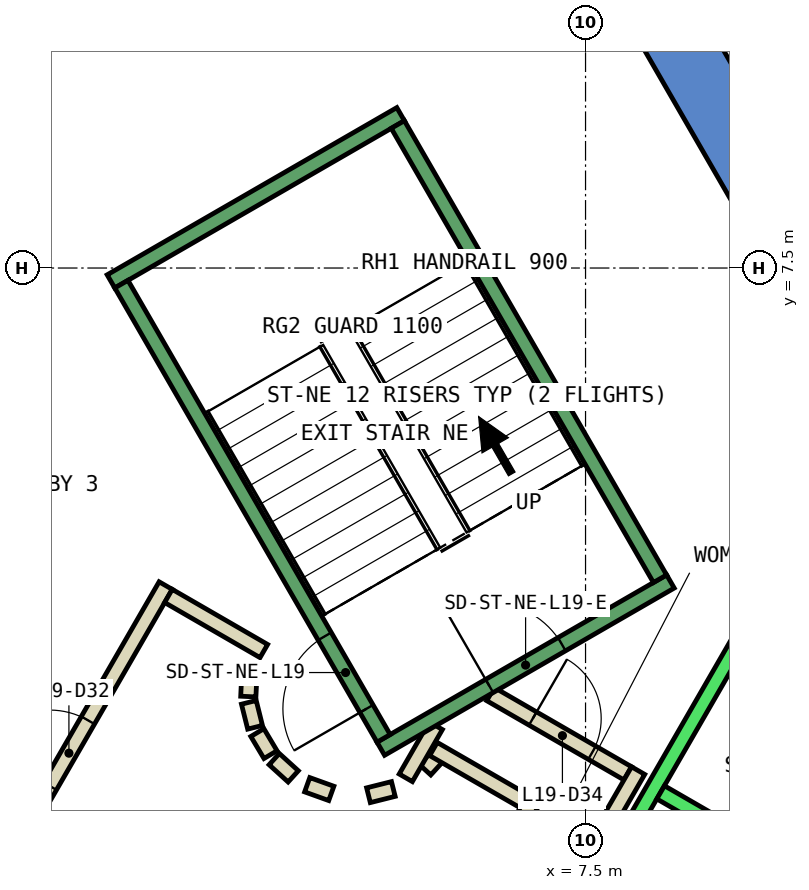
"""IFC4 building model, lengths in metres.
Left out: names, types, materials, properties, quantities, classifications, styles, units other than length and angle.
Written with IfcOpenShell. Run it as: python <this file> out.ifc"""

import sys

from ifc_helpers import new_model, si_unit, direction, frame, frame_2d, origin, place, context, subcontext, project, spatial, polyline, rectangle, outline, extrude, element, fill, save


model = new_model("IFC4")
c1 = context("Model", 3, precision=1e-05, world=origin(), true_north=direction((0.0, 1.0)))
c2 = subcontext(c1, "Body", "Model", "MODEL_VIEW")
j1 = project(units=[si_unit("LENGTHUNIT", "METRE"), si_unit("PLANEANGLEUNIT", "RADIAN")], contexts=[c1])
p1 = place(None, origin())
s1 = spatial("IfcSite", under=j1, at=p1, CompositionType="ELEMENT")
p2 = place(p1, origin())
s2 = spatial("IfcBuilding", under=s1, at=p2, CompositionType="ELEMENT")
p3 = place(p2, frame((0.0, 0.0, 90.8)))
s3 = spatial("IfcBuildingStorey", under=s2, at=p3, CompositionType="ELEMENT", Elevation=90.8)
p4 = place(p3, frame((0.0, 0.0, -0.4)))
e1 = element("IfcWall", 1, at=p4, inside=s3, PredefinedType="SHEAR", context=c2, shape_type="SweptSolid", body=[
    extrude(outline(polyline([(8.517, 11.748), (7.738, 11.298), (12.817, 2.5), (13.856, 2.5), (8.517, 11.748)])), origin(), (0.0, 0.0, 1.0), 4.2),
])
p5 = place(p3, frame((5.39, 0.898, 0.0), z_axis=(0.0, 0.0, 1.0), x_axis=(0.673828488714, 0.738887791073, 0.0)))
e2 = element("IfcWall", 2, at=p5, inside=s3, PredefinedType="PARTITIONING", context=c2, shape_type="SweptSolid", body=[
    extrude(rectangle(XDim=0.263, YDim=0.2, at=frame_2d((0.131, 0.0))), origin(), (0.0, 0.0, 1.0), 3.8),
])
p6 = place(p3, frame((5.499, 1.172, 0.0), z_axis=(0.0, 0.0, 1.0), x_axis=(0.866333505267, -0.499465972466, 0.0)))
e3 = element("IfcWall", 3, at=p6, inside=s3, PredefinedType="PARTITIONING", context=c2, shape_type="SweptSolid", body=[
    extrude(rectangle(XDim=1.374, YDim=0.2, at=frame_2d((0.687, 0.0))), origin(), (0.0, 0.0, 1.0), 3.8),
])
p7 = place(p3, frame((6.826, 0.522, 0.0), z_axis=(0.0, 0.0, 1.0), x_axis=(-0.500016722714, -0.866015748706, 0.0)))
e4 = element("IfcWall", 4, at=p7, inside=s3, PredefinedType="PARTITIONING", context=c2, shape_type="SweptSolid", body=[
    extrude(rectangle(XDim=1.7, YDim=0.2, at=frame_2d((0.85, 0.0))), origin(), (0.0, 0.0, 1.0), 3.8),
])
p8 = place(p3, frame((6.25, 1.894, 0.0), z_axis=(0.0, 0.0, 1.0), x_axis=(0.866043184279, -0.499969202016, 0.0)))
e5 = element("IfcWall", 5, at=p8, inside=s3, PredefinedType="PARTITIONING", context=c2, shape_type="SweptSolid", body=[
    extrude(rectangle(XDim=2.084, YDim=0.2, at=frame_2d((1.042, 0.0))), origin(), (0.0, 0.0, 1.0), 3.8),
])
p9 = place(p8, frame((0.642, 0.0, 0.0)))
e6 = element("IfcOpeningElement", 6, at=p9, cuts=e5, PredefinedType="OPENING", context=c2, shape_type="SweptSolid", body=[
    extrude(rectangle(XDim=0.9, YDim=2.1, at=frame_2d((0.45, 1.05))), frame((0.0, 0.11, 0.0), z_axis=(0.0, -1.0, 0.0), x_axis=(1.0, 0.0, 0.0)), (0.0, 0.0, 1.0), 0.22),
])
p10 = place(p3, frame((8.192, 0.888, 0.0), z_axis=(0.0, 0.0, 1.0), x_axis=(-0.499940625693, -0.866059680843, 0.0)))
e7 = element("IfcWall", 7, at=p10, inside=s3, PredefinedType="PARTITIONING", context=c2, shape_type="SweptSolid", body=[
    extrude(rectangle(XDim=2.68, YDim=0.2, at=frame_2d((1.34, 0.0))), origin(), (0.0, 0.0, 1.0), 3.8),
])
p11 = place(p3, frame((5.135, 0.793, 0.0), z_axis=(0.0, 0.0, 1.0), x_axis=(0.499526442893, 0.866298639529, 0.0)))
e8 = element("IfcWall", 8, at=p11, inside=s3, PredefinedType="PARTITIONING", context=c2, shape_type="SweptSolid", body=[
    extrude(rectangle(XDim=0.791, YDim=0.2, at=frame_2d((0.396, 0.0))), origin(), (0.0, 0.0, 1.0), 3.8),
])
p12 = place(p3, frame((-0.52, -1.0, 0.0), z_axis=(0.0, 0.0, 1.0), x_axis=(0.50011622646, 0.865958290007, 0.0)))
e9 = element("IfcWall", 9, at=p12, inside=s3, PredefinedType="PARTITIONING", context=c2, shape_type="SweptSolid", body=[
    extrude(rectangle(XDim=4.991, YDim=0.2, at=frame_2d((2.496, 0.0))), origin(), (0.0, 0.0, 1.0), 3.8),
])
p13 = place(p12, frame((1.945, 0.0, 0.0)))
e10 = element("IfcOpeningElement", 10, at=p13, cuts=e9, PredefinedType="OPENING", context=c2, shape_type="SweptSolid", body=[
    extrude(rectangle(XDim=1.0, YDim=2.1, at=frame_2d((0.5, 1.05))), frame((0.0, 0.11, 0.0), z_axis=(0.0, -1.0, 0.0), x_axis=(1.0, 0.0, 0.0)), (0.0, 0.0, 1.0), 0.22),
])
p14 = place(p3, frame((2.012, 3.186, 0.0), z_axis=(0.0, 0.0, 1.0), x_axis=(0.865891012941, -0.500232699559, 0.0)))
e11 = element("IfcWall", 11, at=p14, inside=s3, PredefinedType="PARTITIONING", context=c2, shape_type="SweptSolid", body=[
    extrude(rectangle(XDim=1.449, YDim=0.2, at=frame_2d((0.725, 0.0))), origin(), (0.0, 0.0, 1.0), 3.8),
])
p15 = place(p3, frame((3.079, 2.199, 0.0), z_axis=(0.0, 0.0, 1.0), x_axis=(-0.047771483479, -0.998858290933, 0.0)))
e12 = element("IfcWall", 12, at=p15, inside=s3, PredefinedType="PARTITIONING", context=c2, shape_type="SweptSolid", body=[
    extrude(rectangle(XDim=0.337, YDim=0.2, at=frame_2d((0.169, 0.0))), origin(), (0.0, 0.0, 1.0), 3.8),
])
p16 = place(p3, frame((3.07, 1.786, 0.0), z_axis=(0.0, 0.0, 1.0), x_axis=(0.242705583207, -0.970099994784, 0.0)))
e13 = element("IfcWall", 13, at=p16, inside=s3, PredefinedType="PARTITIONING", context=c2, shape_type="SweptSolid", body=[
    extrude(rectangle(XDim=0.338, YDim=0.2, at=frame_2d((0.169, 0.0))), origin(), (0.0, 0.0, 1.0), 3.8),
])
for number, where, z_axis, x_axis in (
    (14, (3.182, 1.388, 0.0), (0.0, 0.0, 1.0), (0.512, -0.859, 0.0)),
    (15, (3.404, 1.039, 0.0), (0.0, 0.0, 1.0), (0.74, -0.672, 0.0)),
):
    element("IfcWall", number, at=place(p3, frame(where, z_axis=z_axis, x_axis=x_axis)), inside=s3, PredefinedType="PARTITIONING", context=c2, shape_type="SweptSolid", body=[
        extrude(rectangle(XDim=0.338, YDim=0.2, at=frame_2d((0.169, 0.0))), origin(), (0.0, 0.0, 1.0), 3.8),
    ])
p17 = place(p3, frame((3.838, 0.702, 0.0), z_axis=(0.0, 0.0, 1.0), x_axis=(0.941035081519, -0.338308993895, 0.0)))
e16 = element("IfcWall", 16, at=p17, inside=s3, PredefinedType="PARTITIONING", context=c2, shape_type="SweptSolid", body=[
    extrude(rectangle(XDim=0.337, YDim=0.2, at=frame_2d((0.168, 0.0))), origin(), (0.0, 0.0, 1.0), 3.8),
])
p18 = place(p3, frame((4.644, 0.564, 0.0), z_axis=(0.0, 0.0, 1.0), x_axis=(0.969929076366, 0.243387729394, 0.0)))
e17 = element("IfcWall", 17, at=p18, inside=s3, PredefinedType="PARTITIONING", context=c2, shape_type="SweptSolid", body=[
    extrude(rectangle(XDim=0.337, YDim=0.2, at=frame_2d((0.168, 0.0))), origin(), (0.0, 0.0, 1.0), 3.8),
])
p19 = place(p3, frame((4.451, -6.19, 0.0), z_axis=(0.0, 0.0, 1.0), x_axis=(0.50000090737, 0.866024879913, 0.0)))
e18 = element("IfcWall", 18, at=p19, inside=s3, PredefinedType="STANDARD", context=c2, shape_type="SweptSolid", body=[
    extrude(rectangle(XDim=10.6, YDim=0.2, at=frame_2d((5.3, 0.0))), origin(), (0.0, 0.0, 1.0), 3.8),
])
p20 = place(p3, frame((8.488, 0.602, 0.0), z_axis=(0.0, 0.0, 1.0), x_axis=(0.866022959057, -0.500004234368, 0.0)))
e19 = element("IfcWall", 19, at=p20, inside=s3, PredefinedType="STANDARD", context=c2, shape_type="SweptSolid", body=[
    extrude(rectangle(XDim=2.5, YDim=0.2, at=frame_2d((1.25, 0.0))), origin(), (0.0, 0.0, 1.0), 3.8),
])
p21 = place(p3, frame((4.806, 1.176, 0.0), z_axis=(0.0, 0.0, 1.0), x_axis=(0.866059941101, 0.499940174841, 0.0)))
e20 = element("IfcWall", 20, at=p21, inside=s3, PredefinedType="STANDARD", context=c2, shape_type="SweptSolid", body=[
    extrude(rectangle(XDim=4.4, YDim=0.2, at=frame_2d((2.2, 0.0))), origin(), (0.0, 0.0, 1.0), 3.8),
])
p22 = place(p21, frame((1.65, 0.0, 0.0)))
e21 = element("IfcOpeningElement", 21, at=p22, cuts=e20, PredefinedType="OPENING", context=c2, shape_type="SweptSolid", body=[
    extrude(rectangle(XDim=1.1, YDim=2.2, at=frame_2d((0.55, 1.1))), frame((0.0, 0.11, 0.0), z_axis=(0.0, -1.0, 0.0), x_axis=(1.0, 0.0, 0.0)), (0.0, 0.0, 1.0), 0.22),
])
p23 = place(p3, frame((1.256, 7.324, 0.0), z_axis=(0.0, 0.0, 1.0), x_axis=(0.866046073146, 0.499964197906, 0.0)))
e22 = element("IfcWall", 22, at=p23, inside=s3, PredefinedType="STANDARD", context=c2, shape_type="SweptSolid", body=[
    extrude(rectangle(XDim=4.4, YDim=0.2, at=frame_2d((2.2, 0.0))), origin(), (0.0, 0.0, 1.0), 3.8),
])
p24 = place(p3, frame((4.843, 1.312, 0.0), z_axis=(0.0, 0.0, 1.0), x_axis=(-0.499963383562, 0.866046543262, 0.0)))
e23 = element("IfcWall", 23, at=p24, inside=s3, PredefinedType="STANDARD", context=c2, shape_type="SweptSolid", body=[
    extrude(rectangle(XDim=6.9, YDim=0.2, at=frame_2d((3.45, 0.0))), origin(), (0.0, 0.0, 1.0), 3.8),
])
p25 = place(p24, frame((0.45, 0.0, 0.0)))
e24 = element("IfcOpeningElement", 24, at=p25, cuts=e23, PredefinedType="OPENING", context=c2, shape_type="SweptSolid", body=[
    extrude(rectangle(XDim=1.1, YDim=2.2, at=frame_2d((0.55, 1.1))), frame((0.0, 0.11, 0.0), z_axis=(0.0, -1.0, 0.0), x_axis=(1.0, 0.0, 0.0)), (0.0, 0.0, 1.0), 0.22),
])
p26 = place(p3, frame((8.48, 3.412, 0.0), z_axis=(0.0, 0.0, 1.0), x_axis=(-0.499978703459, 0.866037698999, 0.0)))
e25 = element("IfcWall", 25, at=p26, inside=s3, PredefinedType="STANDARD", context=c2, shape_type="SweptSolid", body=[
    extrude(rectangle(XDim=6.9, YDim=0.2, at=frame_2d((3.45, 0.0))), origin(), (0.0, 0.0, 1.0), 3.8),
])
p27 = place(p13, origin())
e26 = element("IfcDoor", 26, at=p27, inside=s3, OperationType="SINGLE_SWING_LEFT", PredefinedType="DOOR", context=c2, shape_type="SweptSolid", body=[
    extrude(rectangle(XDim=1.0, YDim=2.1, at=frame_2d((0.5, 1.05))), frame((0.0, 0.025, 0.0), z_axis=(0.0, -1.0, 0.0), x_axis=(1.0, 0.0, 0.0)), (0.0, 0.0, 1.0), 0.05),
])
fill(e10, e26)
p28 = place(p9, origin())
e27 = element("IfcDoor", 27, at=p28, inside=s3, OperationType="SINGLE_SWING_LEFT", PredefinedType="DOOR", context=c2, shape_type="SweptSolid", body=[
    extrude(rectangle(XDim=0.9, YDim=2.1, at=frame_2d((0.45, 1.05))), frame((0.0, 0.025, 0.0), z_axis=(0.0, -1.0, 0.0), x_axis=(1.0, 0.0, 0.0)), (0.0, 0.0, 1.0), 0.05),
])
fill(e6, e27)
p29 = place(p25, origin())
e28 = element("IfcDoor", 28, at=p29, inside=s3, OperationType="SINGLE_SWING_LEFT", PredefinedType="DOOR", context=c2, shape_type="SweptSolid", body=[
    extrude(rectangle(XDim=1.1, YDim=2.2, at=frame_2d((0.55, 1.1))), frame((0.0, 0.025, 0.0), z_axis=(0.0, -1.0, 0.0), x_axis=(1.0, 0.0, 0.0)), (0.0, 0.0, 1.0), 0.05),
])
fill(e24, e28)
p30 = place(p22, origin())
e29 = element("IfcDoor", 29, at=p30, inside=s3, OperationType="SINGLE_SWING_LEFT", PredefinedType="DOOR", context=c2, shape_type="SweptSolid", body=[
    extrude(rectangle(XDim=1.1, YDim=2.2, at=frame_2d((0.55, 1.1))), frame((0.0, 0.025, 0.0), z_axis=(0.0, -1.0, 0.0), x_axis=(1.0, 0.0, 0.0)), (0.0, 0.0, 1.0), 0.05),
])
fill(e21, e29)
save(model, sys.argv[1])
